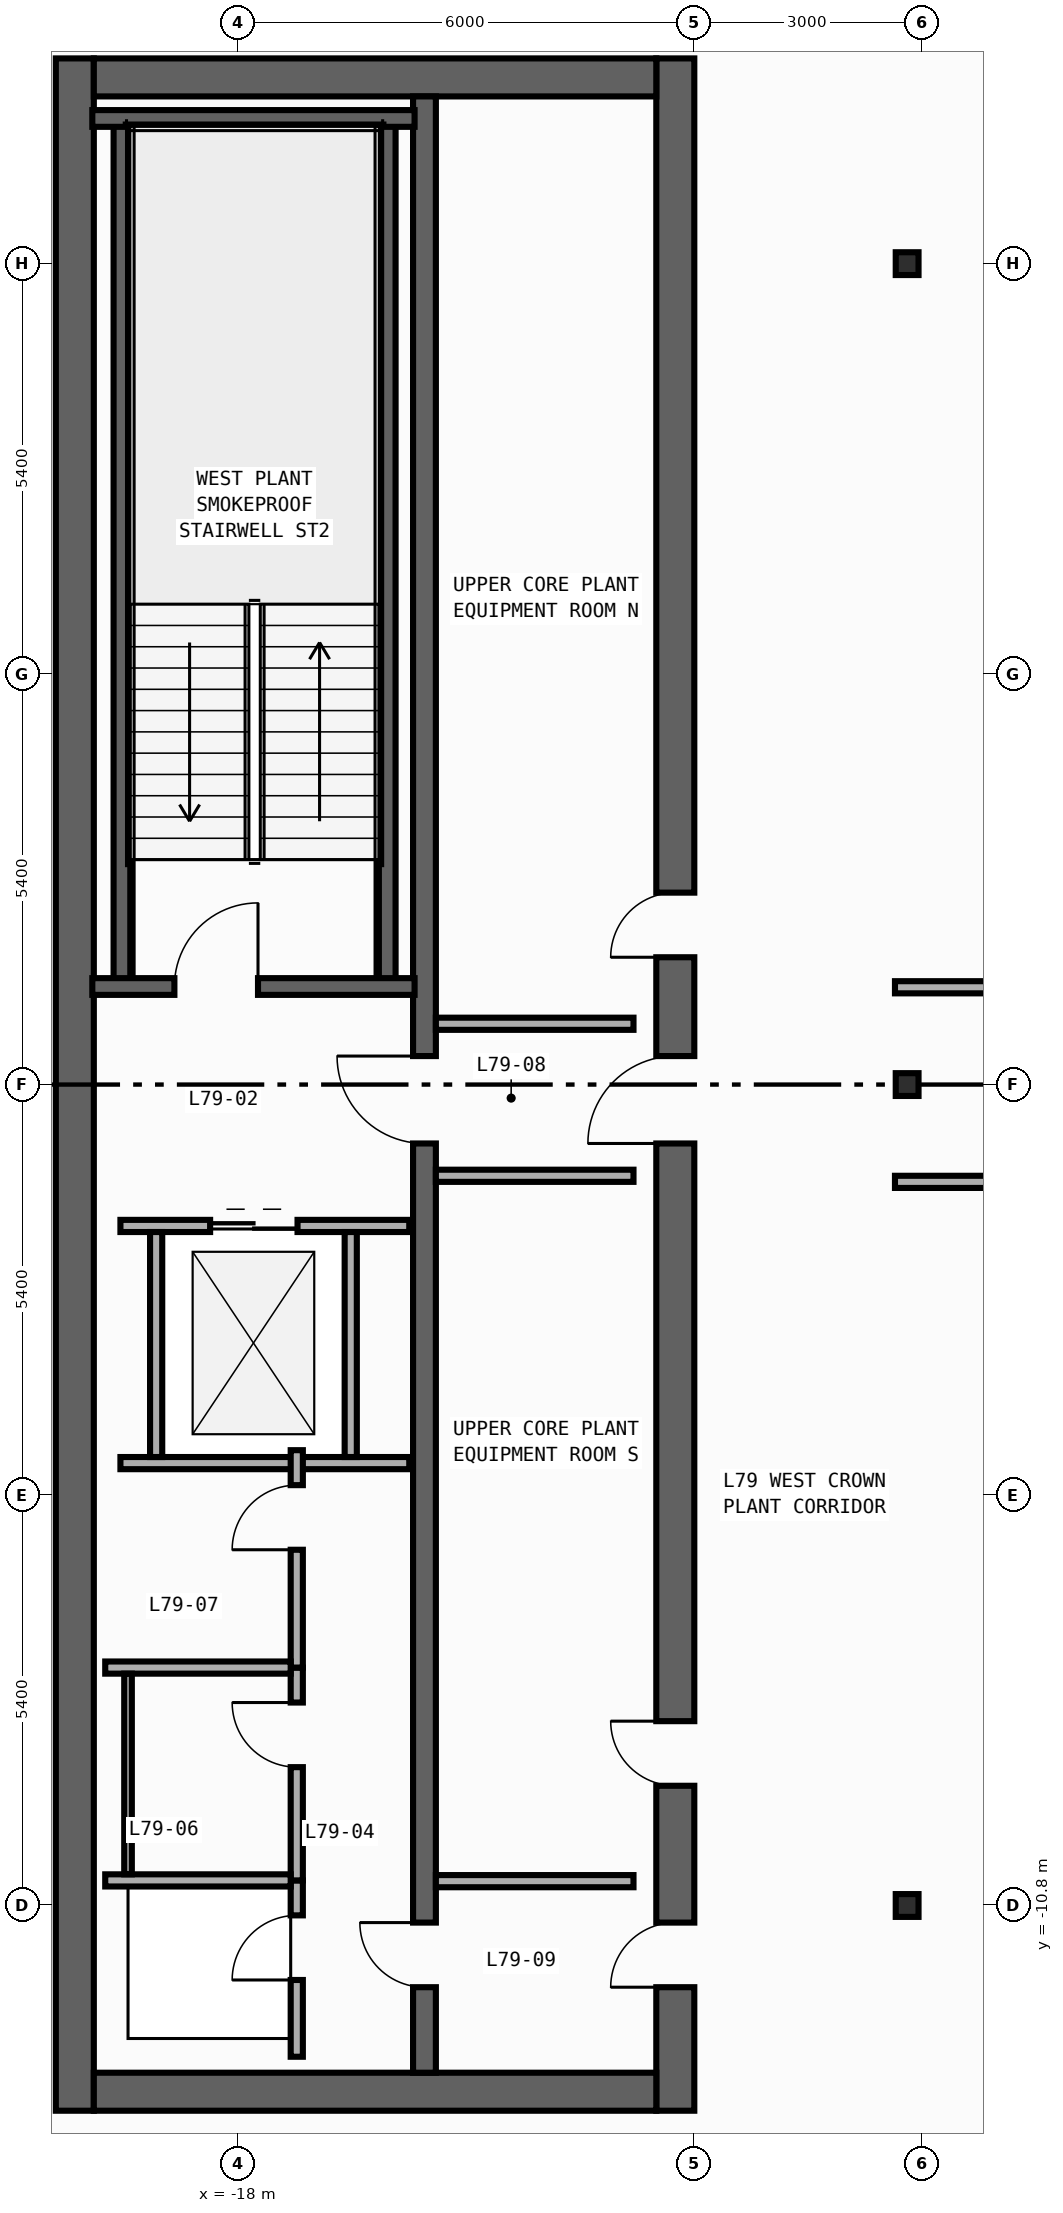
"""IFC4 building model, lengths in metres.
Left out: names, types, materials, properties, quantities, classifications, styles, units other than length and angle.
Written with IfcOpenShell. Run it as: python <this file> out.ifc"""

import sys

from ifc_helpers import new_model, si_unit, direction, frame, frame_2d, origin, origin_2d, place, context, subcontext, project, spatial, rectangle, i_section, extrude, element, fill, save


model = new_model("IFC4")
c1 = context("Model", 3, precision=1e-05, world=origin(), true_north=direction((0.0, 1.0)))
c2 = subcontext(c1, "Body", "Model", "MODEL_VIEW")
j1 = project(units=[si_unit("LENGTHUNIT", "METRE"), si_unit("PLANEANGLEUNIT", "RADIAN")], contexts=[c1])
p1 = place(None, origin())
s1 = spatial("IfcSite", under=j1, at=p1, CompositionType="ELEMENT")
p2 = place(p1, origin())
s2 = spatial("IfcBuilding", under=s1, at=p2, CompositionType="ELEMENT")
p3 = place(p2, frame((0.0, 0.0, 330.4)))
s3 = spatial("IfcBuildingStorey", under=s2, at=p3, CompositionType="ELEMENT", Elevation=330.4)
p4 = place(p3, frame((-20.15, -13.5, 0.0), z_axis=(0.0, 0.0, 1.0), x_axis=(0.0, 1.0, 0.0)))
e1 = element("IfcWall", 1, at=p4, inside=s3, PredefinedType="SHEAR", context=c2, shape_type="SweptSolid", body=[
    extrude(rectangle(XDim=27.0, YDim=0.5, at=frame_2d((13.5, 0.0))), origin(), (0.0, 0.0, 1.0), 4.34),
])
p5 = place(p3, frame((-12.25, -13.5, 0.0), z_axis=(0.0, 0.0, 1.0), x_axis=(0.0, 1.0, 0.0)))
e2 = element("IfcWall", 2, at=p5, inside=s3, PredefinedType="SHEAR", context=c2, shape_type="SweptSolid", body=[
    extrude(rectangle(XDim=27.0, YDim=0.5, at=frame_2d((13.5, 0.0))), origin(), (0.0, 0.0, 1.0), 4.34),
])
p6 = place(p5, frame((15.175, 0.0, 0.0)))
e3 = element("IfcOpeningElement", 3, at=p6, cuts=e2, PredefinedType="OPENING", context=c2, shape_type="SweptSolid", body=[
    extrude(rectangle(XDim=0.85, YDim=2.1, at=frame_2d((0.425, 1.05))), frame((0.0, 0.26, 0.0), z_axis=(0.0, -1.0, 0.0), x_axis=(1.0, 0.0, 0.0)), (0.0, 0.0, 1.0), 0.52),
])
p7 = place(p5, frame((4.275, 0.0, 0.0)))
e4 = element("IfcOpeningElement", 4, at=p7, cuts=e2, PredefinedType="OPENING", context=c2, shape_type="SweptSolid", body=[
    extrude(rectangle(XDim=0.85, YDim=2.1, at=frame_2d((0.425, 1.05))), frame((0.0, 0.26, 0.0), z_axis=(0.0, -1.0, 0.0), x_axis=(1.0, 0.0, 0.0)), (0.0, 0.0, 1.0), 0.52),
])
p8 = place(p5, frame((12.725, 0.0, 0.0)))
e5 = element("IfcOpeningElement", 5, at=p8, cuts=e2, PredefinedType="OPENING", context=c2, shape_type="SweptSolid", body=[
    extrude(rectangle(XDim=1.15, YDim=2.2, at=frame_2d((0.575, 1.1))), frame((0.0, 0.26, 0.0), z_axis=(0.0, -1.0, 0.0), x_axis=(1.0, 0.0, 0.0)), (0.0, 0.0, 1.0), 0.52),
])
p9 = place(p5, frame((1.625, 0.0, 0.0)))
e6 = element("IfcOpeningElement", 6, at=p9, cuts=e2, PredefinedType="OPENING", context=c2, shape_type="SweptSolid", body=[
    extrude(rectangle(XDim=0.85, YDim=2.1, at=frame_2d((0.425, 1.05))), frame((0.0, 0.26, 0.0), z_axis=(0.0, -1.0, 0.0), x_axis=(1.0, 0.0, 0.0)), (0.0, 0.0, 1.0), 0.52),
])
for number, where, z_axis, x_axis in (
    (7, (-19.9, -13.25, 0.0), (0.0, 0.0, 1.0), (1.0, 0.0, 0.0)),
    (8, (-19.9, 13.25, 0.0), (0.0, 0.0, 1.0), (1.0, 0.0, 0.0)),
):
    element("IfcWall", number, at=place(p3, frame(where, z_axis=z_axis, x_axis=x_axis)), inside=s3, PredefinedType="SHEAR", context=c2, shape_type="SweptSolid", body=[
        extrude(rectangle(XDim=7.4, YDim=0.5, at=frame_2d((3.7, 0.0))), origin(), (0.0, 0.0, 1.0), 4.34),
    ])
p10 = place(p3, frame((-15.55, -13.0, 0.0), z_axis=(0.0, 0.0, 1.0), x_axis=(0.0, 1.0, 0.0)))
e9 = element("IfcWall", 9, at=p10, inside=s3, PredefinedType="SHEAR", context=c2, shape_type="SweptSolid", body=[
    extrude(rectangle(XDim=26.0, YDim=0.3, at=frame_2d((13.0, 0.0))), origin(), (0.0, 0.0, 1.0), 4.34),
])
p11 = place(p10, frame((12.225, 0.0, 0.0)))
e10 = element("IfcOpeningElement", 10, at=p11, cuts=e9, PredefinedType="OPENING", context=c2, shape_type="SweptSolid", body=[
    extrude(rectangle(XDim=1.15, YDim=2.2, at=frame_2d((0.575, 1.1))), frame((0.0, 0.16, 0.0), z_axis=(0.0, -1.0, 0.0), x_axis=(1.0, 0.0, 0.0)), (0.0, 0.0, 1.0), 0.32),
])
p12 = place(p10, frame((1.125, 0.0, 0.0)))
e11 = element("IfcOpeningElement", 11, at=p12, cuts=e9, PredefinedType="OPENING", context=c2, shape_type="SweptSolid", body=[
    extrude(rectangle(XDim=0.85, YDim=2.1, at=frame_2d((0.425, 1.05))), frame((0.0, 0.16, 0.0), z_axis=(0.0, -1.0, 0.0), x_axis=(1.0, 0.0, 0.0)), (0.0, 0.0, 1.0), 0.32),
])
for number, where, z_axis, x_axis in (
    (12, (-16.04, 1.29, 0.0), (0.0, 0.0, 1.0), (0.0, 1.0, 0.0)),
    (13, (-19.53, 1.29, 0.0), (0.0, 0.0, 1.0), (0.0, 1.0, 0.0)),
):
    element("IfcWall", number, at=place(p3, frame(where, z_axis=z_axis, x_axis=x_axis)), inside=s3, PredefinedType="SHEAR", context=c2, shape_type="SweptSolid", body=[
        extrude(rectangle(XDim=11.42, YDim=0.22, at=frame_2d((5.71, 0.0))), origin(), (0.0, 0.0, 1.0), 4.34),
    ])
p13 = place(p3, frame((-19.92, 12.71, 0.0), z_axis=(0.0, 0.0, 1.0), x_axis=(1.0, 0.0, 0.0)))
e14 = element("IfcWall", 14, at=p13, inside=s3, PredefinedType="SHEAR", context=c2, shape_type="SweptSolid", body=[
    extrude(rectangle(XDim=4.24, YDim=0.22, at=frame_2d((2.12, 0.0))), origin(), (0.0, 0.0, 1.0), 4.34),
])
p14 = place(p3, frame((-19.92, 1.29, 0.0), z_axis=(0.0, 0.0, 1.0), x_axis=(1.0, 0.0, 0.0)))
e15 = element("IfcWall", 15, at=p14, inside=s3, PredefinedType="SHEAR", context=c2, shape_type="SweptSolid", body=[
    extrude(rectangle(XDim=4.24, YDim=0.22, at=frame_2d((2.12, 0.0))), origin(), (0.0, 0.0, 1.0), 4.34),
])
p15 = place(p14, frame((1.08, 0.0, 0.0)))
e16 = element("IfcOpeningElement", 16, at=p15, cuts=e15, PredefinedType="OPENING", context=c2, shape_type="SweptSolid", body=[
    extrude(rectangle(XDim=1.1, YDim=2.2, at=frame_2d((0.55, 1.1))), frame((0.0, 0.12, 0.0), z_axis=(0.0, -1.0, 0.0), x_axis=(1.0, 0.0, 0.0)), (0.0, 0.0, 1.0), 0.24),
])
for number, where, z_axis, x_axis in (
    (17, (-9.2, -10.8, 0.0), (0.0, 0.0, 1.0), (1.0, 0.0, 0.0)),
    (18, (-9.2, 0.0, 0.0), (0.0, 0.0, 1.0), (1.0, 0.0, 0.0)),
    (19, (-9.2, 10.8, 0.0), (0.0, 0.0, 1.0), (1.0, 0.0, 0.0)),
):
    element("IfcColumn", number, at=place(p3, frame(where, z_axis=z_axis, x_axis=x_axis)), inside=s3, PredefinedType="COLUMN", context=c2, shape_type="SweptSolid", body=[
        extrude(i_section(OverallWidth=0.3, OverallDepth=0.3, WebThickness=0.01, FlangeThickness=0.015, FilletRadius=0.018, at=origin_2d()), origin(), (0.0, 0.0, 1.0), 4.6),
    ])
p16 = place(p3, frame((-19.55, -1.86, 0.0), z_axis=(0.0, 0.0, 1.0), x_axis=(1.0, 0.0, 0.0)))
e20 = element("IfcWall", 20, at=p16, inside=s3, PredefinedType="STANDARD", context=c2, shape_type="SweptSolid", body=[
    extrude(rectangle(XDim=3.8, YDim=0.16, at=frame_2d((1.9, 0.0))), origin(), (0.0, 0.0, 1.0), 4.34),
])
p17 = place(p16, frame((1.18, 0.0, 0.0)))
e21 = element("IfcOpeningElement", 21, at=p17, cuts=e20, PredefinedType="OPENING", context=c2, shape_type="SweptSolid", body=[
    extrude(rectangle(XDim=1.15, YDim=2.2, at=frame_2d((0.575, 1.1))), frame((0.0, 0.09, 0.0), z_axis=(0.0, -1.0, 0.0), x_axis=(1.0, 0.0, 0.0)), (0.0, 0.0, 1.0), 0.18),
])
p18 = place(p3, frame((-19.55, -4.98, 0.0), z_axis=(0.0, 0.0, 1.0), x_axis=(1.0, 0.0, 0.0)))
e22 = element("IfcWall", 22, at=p18, inside=s3, PredefinedType="STANDARD", context=c2, shape_type="SweptSolid", body=[
    extrude(rectangle(XDim=3.8, YDim=0.16, at=frame_2d((1.9, 0.0))), origin(), (0.0, 0.0, 1.0), 4.34),
])
for number, where, z_axis, x_axis in (
    (23, (-19.08, -4.9, 0.0), (0.0, 0.0, 1.0), (0.0, 1.0, 0.0)),
    (24, (-16.52, -4.9, 0.0), (0.0, 0.0, 1.0), (0.0, 1.0, 0.0)),
):
    element("IfcWall", number, at=place(p3, frame(where, z_axis=z_axis, x_axis=x_axis)), inside=s3, PredefinedType="STANDARD", context=c2, shape_type="SweptSolid", body=[
        extrude(rectangle(XDim=2.96, YDim=0.16, at=frame_2d((1.48, 0.0))), origin(), (0.0, 0.0, 1.0), 4.34),
    ])
for number, where, z_axis, x_axis in (
    (25, (-15.4, 0.8, 0.0), (0.0, 0.0, 1.0), (1.0, 0.0, 0.0)),
    (26, (-15.4, -1.2, 0.0), (0.0, 0.0, 1.0), (1.0, 0.0, 0.0)),
    (27, (-15.4, -10.48, 0.0), (0.0, 0.0, 1.0), (1.0, 0.0, 0.0)),
):
    element("IfcWall", number, at=place(p3, frame(where, z_axis=z_axis, x_axis=x_axis)), inside=s3, PredefinedType="STANDARD", context=c2, shape_type="SweptSolid", body=[
        extrude(rectangle(XDim=2.6, YDim=0.16, at=frame_2d((1.3, 0.0))), origin(), (0.0, 0.0, 1.0), 4.34),
    ])
p19 = place(p3, frame((-17.23, -12.79, 0.0), z_axis=(0.0, 0.0, 1.0), x_axis=(0.0, 1.0, 0.0)))
e28 = element("IfcWall", 28, at=p19, inside=s3, PredefinedType="PARTITIONING", context=c2, shape_type="SweptSolid", body=[
    extrude(rectangle(XDim=2.32, YDim=0.16, at=frame_2d((1.16, 0.0))), origin(), (0.0, 0.0, 1.0), 4.34),
])
p20 = place(p19, frame((1.01, 0.0, 0.0)))
e29 = element("IfcOpeningElement", 29, at=p20, cuts=e28, PredefinedType="OPENING", context=c2, shape_type="SweptSolid", body=[
    extrude(rectangle(XDim=0.85, YDim=2.1, at=frame_2d((0.425, 1.05))), frame((0.0, 0.09, 0.0), z_axis=(0.0, -1.0, 0.0), x_axis=(1.0, 0.0, 0.0)), (0.0, 0.0, 1.0), 0.18),
])
p21 = place(p3, frame((-17.23, -10.47, 0.0), z_axis=(0.0, 0.0, 1.0), x_axis=(0.0, 1.0, 0.0)))
e30 = element("IfcWall", 30, at=p21, inside=s3, PredefinedType="PARTITIONING", context=c2, shape_type="SweptSolid", body=[
    extrude(rectangle(XDim=2.8, YDim=0.16, at=frame_2d((1.4, 0.0))), origin(), (0.0, 0.0, 1.0), 4.34),
])
p22 = place(p21, frame((1.49, 0.0, 0.0)))
e31 = element("IfcOpeningElement", 31, at=p22, cuts=e30, PredefinedType="OPENING", context=c2, shape_type="SweptSolid", body=[
    extrude(rectangle(XDim=0.85, YDim=2.1, at=frame_2d((0.425, 1.05))), frame((0.0, 0.09, 0.0), z_axis=(0.0, -1.0, 0.0), x_axis=(1.0, 0.0, 0.0)), (0.0, 0.0, 1.0), 0.18),
])
p23 = place(p3, frame((-17.23, -7.67, 0.0), z_axis=(0.0, 0.0, 1.0), x_axis=(0.0, 1.0, 0.0)))
e32 = element("IfcWall", 32, at=p23, inside=s3, PredefinedType="PARTITIONING", context=c2, shape_type="SweptSolid", body=[
    extrude(rectangle(XDim=2.86, YDim=0.16, at=frame_2d((1.43, 0.0))), origin(), (0.0, 0.0, 1.0), 4.34),
])
p24 = place(p23, frame((1.55, 0.0, 0.0)))
e33 = element("IfcOpeningElement", 33, at=p24, cuts=e32, PredefinedType="OPENING", context=c2, shape_type="SweptSolid", body=[
    extrude(rectangle(XDim=0.85, YDim=2.1, at=frame_2d((0.425, 1.05))), frame((0.0, 0.09, 0.0), z_axis=(0.0, -1.0, 0.0), x_axis=(1.0, 0.0, 0.0)), (0.0, 0.0, 1.0), 0.18),
])
for number, where, z_axis, x_axis in (
    (34, (-19.75, -10.47, 0.0), (0.0, 0.0, 1.0), (1.0, 0.0, 0.0)),
    (35, (-19.75, -7.67, 0.0), (0.0, 0.0, 1.0), (1.0, 0.0, 0.0)),
):
    element("IfcWall", number, at=place(p3, frame(where, z_axis=z_axis, x_axis=x_axis)), inside=s3, PredefinedType="PARTITIONING", context=c2, shape_type="SweptSolid", body=[
        extrude(rectangle(XDim=2.44, YDim=0.16, at=frame_2d((1.22, 0.0))), origin(), (0.0, 0.0, 1.0), 4.34),
    ])
p25 = place(p3, frame((-9.36, 1.28, 0.0), z_axis=(0.0, 0.0, 1.0), x_axis=(1.0, 0.0, 0.0)))
e36 = element("IfcWall", 36, at=p25, inside=s3, PredefinedType="PARTITIONING", context=c2, shape_type="SweptSolid", body=[
    extrude(rectangle(XDim=13.94, YDim=0.16, at=frame_2d((6.97, 0.0))), origin(), (0.0, 0.0, 1.0), 4.34),
])
p26 = place(p25, frame((8.944, 0.0, 0.0)))
e37 = element("IfcOpeningElement", 37, at=p26, cuts=e36, PredefinedType="OPENING", context=c2, shape_type="SweptSolid", body=[
    extrude(rectangle(XDim=0.9, YDim=2.15, at=frame_2d((0.45, 1.075))), frame((0.0, 0.09, 0.0), z_axis=(0.0, -1.0, 0.0), x_axis=(1.0, 0.0, 0.0)), (0.0, 0.0, 1.0), 0.18),
])
p27 = place(p3, frame((-9.36, -1.28, 0.0), z_axis=(0.0, 0.0, 1.0), x_axis=(1.0, 0.0, 0.0)))
e38 = element("IfcWall", 38, at=p27, inside=s3, PredefinedType="PARTITIONING", context=c2, shape_type="SweptSolid", body=[
    extrude(rectangle(XDim=8.24, YDim=0.16, at=frame_2d((4.12, 0.0))), origin(), (0.0, 0.0, 1.0), 4.34),
])
p28 = place(p27, frame((6.88, 0.0, 0.0)))
e39 = element("IfcOpeningElement", 39, at=p28, cuts=e38, PredefinedType="OPENING", context=c2, shape_type="SweptSolid", body=[
    extrude(rectangle(XDim=0.9, YDim=2.15, at=frame_2d((0.45, 1.075))), frame((0.0, 0.09, 0.0), z_axis=(0.0, -1.0, 0.0), x_axis=(1.0, 0.0, 0.0)), (0.0, 0.0, 1.0), 0.18),
])
p29 = place(p3, frame((-19.45, -10.39, 0.0), z_axis=(0.0, 0.0, 1.0), x_axis=(0.0, 1.0, 0.0)))
e40 = element("IfcWall", 40, at=p29, inside=s3, PredefinedType="PARTITIONING", context=c2, shape_type="SweptSolid", body=[
    extrude(rectangle(XDim=2.64, YDim=0.1, at=frame_2d((1.32, 0.0))), origin(), (0.0, 0.0, 1.0), 4.34),
])
p30 = place(p15, origin())
e41 = element("IfcDoor", 41, at=p30, inside=s3, OperationType="SINGLE_SWING_RIGHT", PredefinedType="DOOR", context=c2, shape_type="SweptSolid", body=[
    extrude(rectangle(XDim=1.1, YDim=2.2, at=frame_2d((0.55, 1.1))), frame((0.0, 0.025, 0.0), z_axis=(0.0, -1.0, 0.0), x_axis=(1.0, 0.0, 0.0)), (0.0, 0.0, 1.0), 0.05),
])
fill(e16, e41)
p31 = place(p6, origin())
e42 = element("IfcDoor", 42, at=p31, inside=s3, OperationType="SINGLE_SWING_LEFT", PredefinedType="DOOR", context=c2, shape_type="SweptSolid", body=[
    extrude(rectangle(XDim=0.85, YDim=2.1, at=frame_2d((0.425, 1.05))), frame((0.0, 0.025, 0.0), z_axis=(0.0, -1.0, 0.0), x_axis=(1.0, 0.0, 0.0)), (0.0, 0.0, 1.0), 0.05),
])
fill(e3, e42)
p32 = place(p7, origin())
e43 = element("IfcDoor", 43, at=p32, inside=s3, OperationType="SINGLE_SWING_RIGHT", PredefinedType="DOOR", context=c2, shape_type="SweptSolid", body=[
    extrude(rectangle(XDim=0.85, YDim=2.1, at=frame_2d((0.425, 1.05))), frame((0.0, 0.025, 0.0), z_axis=(0.0, -1.0, 0.0), x_axis=(1.0, 0.0, 0.0)), (0.0, 0.0, 1.0), 0.05),
])
fill(e4, e43)
p33 = place(p8, origin())
e44 = element("IfcDoor", 44, at=p33, inside=s3, OperationType="SINGLE_SWING_LEFT", PredefinedType="DOOR", context=c2, shape_type="SweptSolid", body=[
    extrude(rectangle(XDim=1.15, YDim=2.2, at=frame_2d((0.575, 1.1))), frame((0.0, 0.025, 0.0), z_axis=(0.0, -1.0, 0.0), x_axis=(1.0, 0.0, 0.0)), (0.0, 0.0, 1.0), 0.05),
])
fill(e5, e44)
p34 = place(p11, origin())
e45 = element("IfcDoor", 45, at=p34, inside=s3, OperationType="SINGLE_SWING_RIGHT", PredefinedType="DOOR", context=c2, shape_type="SweptSolid", body=[
    extrude(rectangle(XDim=1.15, YDim=2.2, at=frame_2d((0.575, 1.1))), frame((0.0, 0.025, 0.0), z_axis=(0.0, -1.0, 0.0), x_axis=(1.0, 0.0, 0.0)), (0.0, 0.0, 1.0), 0.05),
])
fill(e10, e45)
p35 = place(p9, origin())
e46 = element("IfcDoor", 46, at=p35, inside=s3, OperationType="SINGLE_SWING_LEFT", PredefinedType="DOOR", context=c2, shape_type="SweptSolid", body=[
    extrude(rectangle(XDim=0.85, YDim=2.1, at=frame_2d((0.425, 1.05))), frame((0.0, 0.025, 0.0), z_axis=(0.0, -1.0, 0.0), x_axis=(1.0, 0.0, 0.0)), (0.0, 0.0, 1.0), 0.05),
])
fill(e6, e46)
p36 = place(p12, origin())
e47 = element("IfcDoor", 47, at=p36, inside=s3, OperationType="SINGLE_SWING_RIGHT", PredefinedType="DOOR", context=c2, shape_type="SweptSolid", body=[
    extrude(rectangle(XDim=0.85, YDim=2.1, at=frame_2d((0.425, 1.05))), frame((0.0, 0.025, 0.0), z_axis=(0.0, -1.0, 0.0), x_axis=(1.0, 0.0, 0.0)), (0.0, 0.0, 1.0), 0.05),
])
fill(e11, e47)
p37 = place(p17, origin())
e48 = element("IfcDoor", 48, at=p37, inside=s3, OperationType="DOUBLE_DOOR_SLIDING", PredefinedType="DOOR", context=c2, shape_type="SweptSolid", body=[
    extrude(rectangle(XDim=1.15, YDim=2.2, at=frame_2d((0.575, 1.1))), frame((0.0, 0.025, 0.0), z_axis=(0.0, -1.0, 0.0), x_axis=(1.0, 0.0, 0.0)), (0.0, 0.0, 1.0), 0.05),
])
fill(e21, e48)
p38 = place(p20, origin())
e49 = element("IfcDoor", 49, at=p38, inside=s3, OperationType="SINGLE_SWING_LEFT", PredefinedType="DOOR", context=c2, shape_type="SweptSolid", body=[
    extrude(rectangle(XDim=0.85, YDim=2.1, at=frame_2d((0.425, 1.05))), frame((0.0, 0.025, 0.0), z_axis=(0.0, -1.0, 0.0), x_axis=(1.0, 0.0, 0.0)), (0.0, 0.0, 1.0), 0.05),
])
fill(e29, e49)
p39 = place(p22, origin())
e50 = element("IfcDoor", 50, at=p39, inside=s3, OperationType="SINGLE_SWING_RIGHT", PredefinedType="DOOR", context=c2, shape_type="SweptSolid", body=[
    extrude(rectangle(XDim=0.85, YDim=2.1, at=frame_2d((0.425, 1.05))), frame((0.0, 0.025, 0.0), z_axis=(0.0, -1.0, 0.0), x_axis=(1.0, 0.0, 0.0)), (0.0, 0.0, 1.0), 0.05),
])
fill(e31, e50)
p40 = place(p24, origin())
e51 = element("IfcDoor", 51, at=p40, inside=s3, OperationType="SINGLE_SWING_LEFT", PredefinedType="DOOR", context=c2, shape_type="SweptSolid", body=[
    extrude(rectangle(XDim=0.85, YDim=2.1, at=frame_2d((0.425, 1.05))), frame((0.0, 0.025, 0.0), z_axis=(0.0, -1.0, 0.0), x_axis=(1.0, 0.0, 0.0)), (0.0, 0.0, 1.0), 0.05),
])
fill(e33, e51)
save(model, sys.argv[1])
